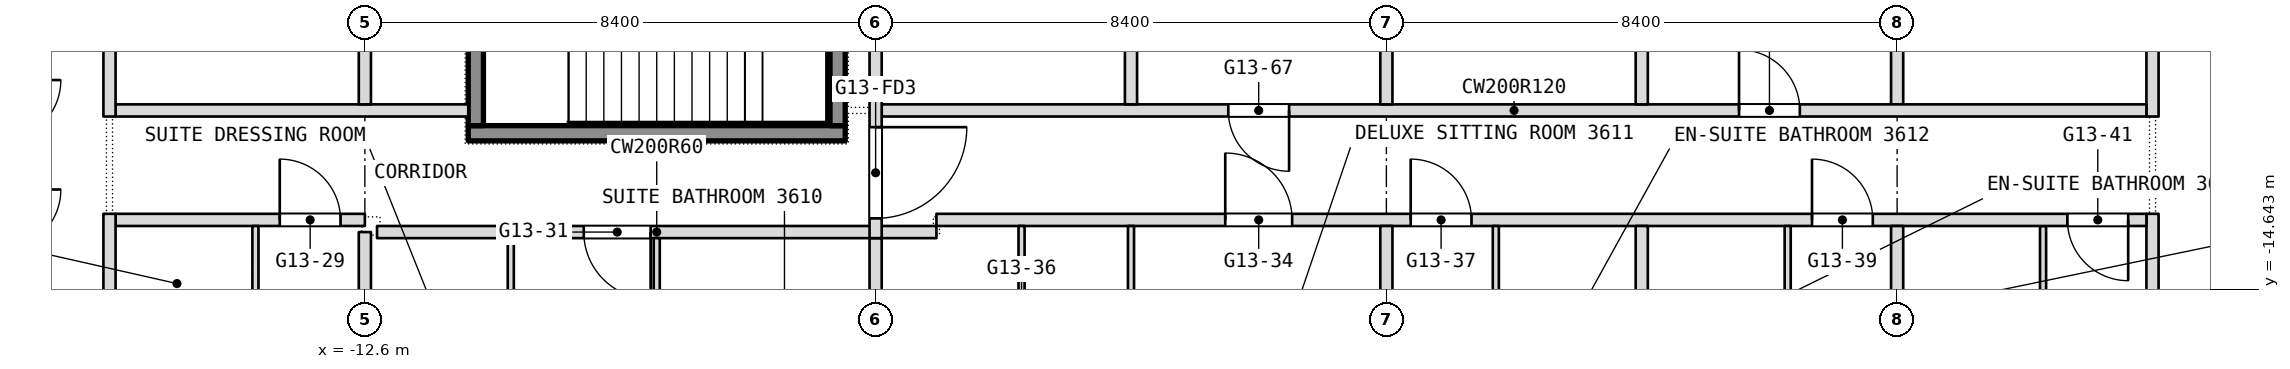
"""IFC4 building model, lengths in metres.
Left out: names, types, materials, properties, quantities, classifications, styles, units other than length and angle.
Written with IfcOpenShell. Run it as: python <this file> out.ifc"""

import sys

from ifc_helpers import new_model, si_unit, direction, frame, frame_2d, origin, place, context, subcontext, project, spatial, rectangle, extrude, element, fill, save


model = new_model("IFC4")
c1 = context("Model", 3, precision=1e-05, world=origin(), true_north=direction((0.0, 1.0)))
c2 = subcontext(c1, "Body", "Model", "MODEL_VIEW")
j1 = project(units=[si_unit("LENGTHUNIT", "METRE"), si_unit("PLANEANGLEUNIT", "RADIAN")], contexts=[c1])
p1 = place(None, origin())
s1 = spatial("IfcSite", under=j1, at=p1, CompositionType="ELEMENT")
p2 = place(p1, origin())
s2 = spatial("IfcBuilding", under=s1, at=p2, CompositionType="ELEMENT")
p3 = place(p2, frame((0.0, 0.0, 155.3)))
s3 = spatial("IfcBuildingStorey", under=s2, at=p3, CompositionType="ELEMENT", Elevation=155.3)
p4 = place(p3, frame((16.8, -22.186, 0.0), z_axis=(0.0, 0.0, 1.0), x_axis=(0.0, 1.0, 0.0)))
e1 = element("IfcWall", 1, at=p4, inside=s3, PredefinedType="PARTITIONING", context=c2, shape_type="SweptSolid", body=[
    extrude(rectangle(XDim=8.786, YDim=0.2, at=frame_2d((4.393, 0.0))), origin(), (0.0, 0.0, 1.0), 3.34),
])
p5 = place(p3, frame((16.8, -11.8, 0.0), z_axis=(0.0, 0.0, 1.0), x_axis=(0.0, 1.0, 0.0)))
e2 = element("IfcWall", 2, at=p5, inside=s3, PredefinedType="PARTITIONING", context=c2, shape_type="SweptSolid", body=[
    extrude(rectangle(XDim=9.9, YDim=0.2, at=frame_2d((4.95, 0.0))), origin(), (0.0, 0.0, 1.0), 3.34),
])
p6 = place(p3, frame((15.0, -16.85, 0.0), z_axis=(0.0, 0.0, 1.0), x_axis=(0.0, 1.0, 0.0)))
e3 = element("IfcWall", 3, at=p6, inside=s3, PredefinedType="PARTITIONING", context=c2, shape_type="SweptSolid", body=[
    extrude(rectangle(XDim=3.25, YDim=0.1, at=frame_2d((1.625, 0.0))), origin(), (0.0, 0.0, 1.0), 3.34),
])
p7 = place(p3, frame((-12.4, -13.7, 0.0), z_axis=(0.0, 0.0, 1.0), x_axis=(1.0, 0.0, 0.0)))
e4 = element("IfcWall", 4, at=p7, inside=s3, PredefinedType="PARTITIONING", context=c2, shape_type="SweptSolid", body=[
    extrude(rectangle(XDim=9.2, YDim=0.2, at=frame_2d((4.6, 0.0))), origin(), (0.0, 0.0, 1.0), 3.34),
])
p8 = place(p7, frame((3.4, 0.0, 0.0)))
e5 = element("IfcOpeningElement", 5, at=p8, cuts=e4, PredefinedType="OPENING", context=c2, shape_type="SweptSolid", body=[
    extrude(rectangle(XDim=1.1, YDim=2.1, at=frame_2d((0.55, 1.05))), frame((0.0, 0.1, 0.0), z_axis=(0.0, -1.0, 0.0), x_axis=(1.0, 0.0, 0.0)), (0.0, 0.0, 1.0), 0.2),
])
p9 = place(p3, frame((-16.7, -13.5, 0.0), z_axis=(0.0, 0.0, 1.0), x_axis=(1.0, 0.0, 0.0)))
e6 = element("IfcWall", 6, at=p9, inside=s3, PredefinedType="PARTITIONING", context=c2, shape_type="SweptSolid", body=[
    extrude(rectangle(XDim=4.1, YDim=0.2, at=frame_2d((2.05, 0.0))), origin(), (0.0, 0.0, 1.0), 3.34),
])
p10 = place(p9, frame((2.7, 0.0, 0.0)))
e7 = element("IfcOpeningElement", 7, at=p10, cuts=e6, PredefinedType="OPENING", context=c2, shape_type="SweptSolid", body=[
    extrude(rectangle(XDim=1.0, YDim=2.1, at=frame_2d((0.5, 1.05))), frame((0.0, 0.1, 0.0), z_axis=(0.0, -1.0, 0.0), x_axis=(1.0, 0.0, 0.0)), (0.0, 0.0, 1.0), 0.2),
])
p11 = place(p3, frame((-3.2, -13.5, 0.0), z_axis=(0.0, 0.0, 1.0), x_axis=(1.0, 0.0, 0.0)))
e8 = element("IfcWall", 8, at=p11, inside=s3, PredefinedType="PARTITIONING", context=c2, shape_type="SweptSolid", body=[
    extrude(rectangle(XDim=19.9, YDim=0.2, at=frame_2d((9.95, 0.0))), origin(), (0.0, 0.0, 1.0), 3.34),
])
p12 = place(p11, frame((4.75, 0.0, 0.0)))
e9 = element("IfcOpeningElement", 9, at=p12, cuts=e8, PredefinedType="OPENING", context=c2, shape_type="SweptSolid", body=[
    extrude(rectangle(XDim=1.1, YDim=2.1, at=frame_2d((0.55, 1.05))), frame((0.0, 0.1, 0.0), z_axis=(0.0, -1.0, 0.0), x_axis=(1.0, 0.0, 0.0)), (0.0, 0.0, 1.0), 0.2),
])
p13 = place(p11, frame((7.8, 0.0, 0.0)))
e10 = element("IfcOpeningElement", 10, at=p13, cuts=e8, PredefinedType="OPENING", context=c2, shape_type="SweptSolid", body=[
    extrude(rectangle(XDim=1.0, YDim=2.1, at=frame_2d((0.5, 1.05))), frame((0.0, 0.1, 0.0), z_axis=(0.0, -1.0, 0.0), x_axis=(1.0, 0.0, 0.0)), (0.0, 0.0, 1.0), 0.2),
])
p14 = place(p11, frame((14.4, 0.0, 0.0)))
e11 = element("IfcOpeningElement", 11, at=p14, cuts=e8, PredefinedType="OPENING", context=c2, shape_type="SweptSolid", body=[
    extrude(rectangle(XDim=1.0, YDim=2.1, at=frame_2d((0.5, 1.05))), frame((0.0, 0.1, 0.0), z_axis=(0.0, -1.0, 0.0), x_axis=(1.0, 0.0, 0.0)), (0.0, 0.0, 1.0), 0.2),
])
p15 = place(p11, frame((18.6, 0.0, 0.0)))
e12 = element("IfcOpeningElement", 12, at=p15, cuts=e8, PredefinedType="OPENING", context=c2, shape_type="SweptSolid", body=[
    extrude(rectangle(XDim=1.0, YDim=2.1, at=frame_2d((0.5, 1.05))), frame((0.0, 0.1, 0.0), z_axis=(0.0, -1.0, 0.0), x_axis=(1.0, 0.0, 0.0)), (0.0, 0.0, 1.0), 0.2),
])
p16 = place(p3, frame((12.6, -21.175, 0.0), z_axis=(0.0, 0.0, 1.0), x_axis=(0.0, 1.0, 0.0)))
e13 = element("IfcWall", 13, at=p16, inside=s3, PredefinedType="PARTITIONING", context=c2, shape_type="SweptSolid", body=[
    extrude(rectangle(XDim=7.575, YDim=0.2, at=frame_2d((3.788, 0.0))), origin(), (0.0, 0.0, 1.0), 3.34),
])
p17 = place(p3, frame((12.6, -11.6, 0.0), z_axis=(0.0, 0.0, 1.0), x_axis=(0.0, 1.0, 0.0)))
e14 = element("IfcWall", 14, at=p17, inside=s3, PredefinedType="PARTITIONING", context=c2, shape_type="SweptSolid", body=[
    extrude(rectangle(XDim=3.9, YDim=0.2, at=frame_2d((1.95, 0.0))), origin(), (0.0, 0.0, 1.0), 3.34),
])
p18 = place(p3, frame((-16.7, -11.7, 0.0), z_axis=(0.0, 0.0, 1.0), x_axis=(1.0, 0.0, 0.0)))
e15 = element("IfcWall", 15, at=p18, inside=s3, PredefinedType="PARTITIONING", context=c2, shape_type="SweptSolid", body=[
    extrude(rectangle(XDim=5.8, YDim=0.2, at=frame_2d((2.9, 0.0))), origin(), (0.0, 0.0, 1.0), 3.34),
])
p19 = place(p3, frame((-4.1, -11.7, 0.0), z_axis=(0.0, 0.0, 1.0), x_axis=(1.0, 0.0, 0.0)))
e16 = element("IfcWall", 16, at=p19, inside=s3, PredefinedType="PARTITIONING", context=c2, shape_type="SweptSolid", body=[
    extrude(rectangle(XDim=20.8, YDim=0.2, at=frame_2d((10.4, 0.0))), origin(), (0.0, 0.0, 1.0), 3.34),
])
p20 = place(p19, frame((14.1, 0.0, 0.0)))
e17 = element("IfcOpeningElement", 17, at=p20, cuts=e16, PredefinedType="OPENING", context=c2, shape_type="SweptSolid", body=[
    extrude(rectangle(XDim=1.0, YDim=2.1, at=frame_2d((0.5, 1.05))), frame((0.0, 0.1, 0.0), z_axis=(0.0, -1.0, 0.0), x_axis=(1.0, 0.0, 0.0)), (0.0, 0.0, 1.0), 0.2),
])
p21 = place(p19, frame((5.7, 0.0, 0.0)))
e18 = element("IfcOpeningElement", 18, at=p21, cuts=e16, PredefinedType="OPENING", context=c2, shape_type="SweptSolid", body=[
    extrude(rectangle(XDim=1.0, YDim=2.1, at=frame_2d((0.5, 1.05))), frame((0.0, 0.1, 0.0), z_axis=(0.0, -1.0, 0.0), x_axis=(1.0, 0.0, 0.0)), (0.0, 0.0, 1.0), 0.2),
])
p22 = place(p3, frame((10.8, -17.65, 0.0), z_axis=(0.0, 0.0, 1.0), x_axis=(0.0, 1.0, 0.0)))
e19 = element("IfcWall", 19, at=p22, inside=s3, PredefinedType="PARTITIONING", context=c2, shape_type="SweptSolid", body=[
    extrude(rectangle(XDim=4.05, YDim=0.1, at=frame_2d((2.025, 0.0))), origin(), (0.0, 0.0, 1.0), 3.34),
])
p23 = place(p3, frame((8.4, -23.3, 0.0), z_axis=(0.0, 0.0, 1.0), x_axis=(0.0, 1.0, 0.0)))
e20 = element("IfcWall", 20, at=p23, inside=s3, PredefinedType="PARTITIONING", context=c2, shape_type="SweptSolid", body=[
    extrude(rectangle(XDim=9.7, YDim=0.2, at=frame_2d((4.85, 0.0))), origin(), (0.0, 0.0, 1.0), 3.34),
])
p24 = place(p3, frame((8.4, -11.6, 0.0), z_axis=(0.0, 0.0, 1.0), x_axis=(0.0, 1.0, 0.0)))
e21 = element("IfcWall", 21, at=p24, inside=s3, PredefinedType="PARTITIONING", context=c2, shape_type="SweptSolid", body=[
    extrude(rectangle(XDim=3.8, YDim=0.2, at=frame_2d((1.9, 0.0))), origin(), (0.0, 0.0, 1.0), 3.34),
])
p25 = place(p3, frame((6.0, -17.75, 0.0), z_axis=(0.0, 0.0, 1.0), x_axis=(0.0, 1.0, 0.0)))
e22 = element("IfcWall", 22, at=p25, inside=s3, PredefinedType="PARTITIONING", context=c2, shape_type="SweptSolid", body=[
    extrude(rectangle(XDim=4.15, YDim=0.1, at=frame_2d((2.075, 0.0))), origin(), (0.0, 0.0, 1.0), 3.34),
])
p26 = place(p3, frame((4.2, -23.3, 0.0), z_axis=(0.0, 0.0, 1.0), x_axis=(0.0, 1.0, 0.0)))
e23 = element("IfcWall", 23, at=p26, inside=s3, PredefinedType="PARTITIONING", context=c2, shape_type="SweptSolid", body=[
    extrude(rectangle(XDim=9.7, YDim=0.2, at=frame_2d((4.85, 0.0))), origin(), (0.0, 0.0, 1.0), 3.34),
])
p27 = place(p3, frame((4.2, -11.6, 0.0), z_axis=(0.0, 0.0, 1.0), x_axis=(0.0, 1.0, 0.0)))
e24 = element("IfcWall", 24, at=p27, inside=s3, PredefinedType="PARTITIONING", context=c2, shape_type="SweptSolid", body=[
    extrude(rectangle(XDim=9.7, YDim=0.2, at=frame_2d((4.85, 0.0))), origin(), (0.0, 0.0, 1.0), 3.34),
])
p28 = place(p3, frame((0.0, -23.3, 0.0), z_axis=(0.0, 0.0, 1.0), x_axis=(0.0, 1.0, 0.0)))
e25 = element("IfcWall", 25, at=p28, inside=s3, PredefinedType="PARTITIONING", context=c2, shape_type="SweptSolid", body=[
    extrude(rectangle(XDim=9.7, YDim=0.1, at=frame_2d((4.85, 0.0))), origin(), (0.0, 0.0, 1.0), 3.34),
])
p29 = place(p28, frame((3.65, 0.0, 0.0)))
e26 = element("IfcOpeningElement", 26, at=p29, cuts=e25, PredefinedType="OPENING", context=c2, shape_type="SweptSolid", body=[
    extrude(rectangle(XDim=0.9, YDim=2.1, at=frame_2d((0.45, 1.05))), frame((0.0, 0.05, 0.0), z_axis=(0.0, -1.0, 0.0), x_axis=(1.0, 0.0, 0.0)), (0.0, 0.0, 1.0), 0.1),
])
p30 = place(p3, frame((0.0, -11.6, 0.0), z_axis=(0.0, 0.0, 1.0), x_axis=(0.0, 1.0, 0.0)))
e27 = element("IfcWall", 27, at=p30, inside=s3, PredefinedType="PARTITIONING", context=c2, shape_type="SweptSolid", body=[
    extrude(rectangle(XDim=9.7, YDim=0.2, at=frame_2d((4.85, 0.0))), origin(), (0.0, 0.0, 1.0), 3.34),
])
p31 = place(p3, frame((-1.8, -17.05, 0.0), z_axis=(0.0, 0.0, 1.0), x_axis=(0.0, 1.0, 0.0)))
e28 = element("IfcWall", 28, at=p31, inside=s3, PredefinedType="PARTITIONING", context=c2, shape_type="SweptSolid", body=[
    extrude(rectangle(XDim=3.45, YDim=0.1, at=frame_2d((1.725, 0.0))), origin(), (0.0, 0.0, 1.0), 3.34),
])
p32 = place(p31, frame((1.3, 0.0, 0.0)))
e29 = element("IfcOpeningElement", 29, at=p32, cuts=e28, PredefinedType="OPENING", context=c2, shape_type="SweptSolid", body=[
    extrude(rectangle(XDim=0.9, YDim=2.1, at=frame_2d((0.45, 1.05))), frame((0.0, 0.05, 0.0), z_axis=(0.0, -1.0, 0.0), x_axis=(1.0, 0.0, 0.0)), (0.0, 0.0, 1.0), 0.1),
])
p33 = place(p3, frame((-4.2, -23.3, 0.0), z_axis=(0.0, 0.0, 1.0), x_axis=(0.0, 1.0, 0.0)))
e30 = element("IfcWall", 30, at=p33, inside=s3, PredefinedType="PARTITIONING", context=c2, shape_type="SweptSolid", body=[
    extrude(rectangle(XDim=9.5, YDim=0.2, at=frame_2d((4.75, 0.0))), origin(), (0.0, 0.0, 1.0), 3.34),
])
p34 = place(p3, frame((-4.2, -13.8, 0.0), z_axis=(0.0, 0.0, 1.0), x_axis=(0.0, 1.0, 0.0)))
e31 = element("IfcWall", 31, at=p34, inside=s3, PredefinedType="PARTITIONING", context=c2, shape_type="SweptSolid", body=[
    extrude(rectangle(XDim=13.8, YDim=0.2, at=frame_2d((6.9, 0.0))), origin(), (0.0, 0.0, 1.0), 3.34),
])
p35 = place(p34, frame((12.15, 0.0, 0.0)))
e32 = element("IfcOpeningElement", 32, at=p35, cuts=e31, PredefinedType="OPENING", context=c2, shape_type="SweptSolid", body=[
    extrude(rectangle(XDim=1.5, YDim=2.1, at=frame_2d((0.75, 1.05))), frame((0.0, 0.1, 0.0), z_axis=(0.0, -1.0, 0.0), x_axis=(1.0, 0.0, 0.0)), (0.0, 0.0, 1.0), 0.2),
])
p36 = place(p34, frame((0.325, 0.0, 0.0)))
e33 = element("IfcOpeningElement", 33, at=p36, cuts=e31, PredefinedType="OPENING", context=c2, shape_type="SweptSolid", body=[
    extrude(rectangle(XDim=1.5, YDim=2.1, at=frame_2d((0.75, 1.05))), frame((0.0, 0.1, 0.0), z_axis=(0.0, -1.0, 0.0), x_axis=(1.0, 0.0, 0.0)), (0.0, 0.0, 1.0), 0.2),
])
p37 = place(p3, frame((-7.8, -17.35, 0.0), z_axis=(0.0, 0.0, 1.0), x_axis=(0.0, 1.0, 0.0)))
e34 = element("IfcWall", 34, at=p37, inside=s3, PredefinedType="PARTITIONING", context=c2, shape_type="SweptSolid", body=[
    extrude(rectangle(XDim=3.55, YDim=0.1, at=frame_2d((1.775, 0.0))), origin(), (0.0, 0.0, 1.0), 3.34),
])
p38 = place(p3, frame((-10.2, -17.25, 0.0), z_axis=(0.0, 0.0, 1.0), x_axis=(0.0, 1.0, 0.0)))
e35 = element("IfcWall", 35, at=p38, inside=s3, PredefinedType="PARTITIONING", context=c2, shape_type="SweptSolid", body=[
    extrude(rectangle(XDim=3.45, YDim=0.1, at=frame_2d((1.725, 0.0))), origin(), (0.0, 0.0, 1.0), 3.34),
])
p39 = place(p3, frame((-12.6, -21.175, 0.0), z_axis=(0.0, 0.0, 1.0), x_axis=(0.0, 1.0, 0.0)))
e36 = element("IfcWall", 36, at=p39, inside=s3, PredefinedType="PARTITIONING", context=c2, shape_type="SweptSolid", body=[
    extrude(rectangle(XDim=7.475, YDim=0.2, at=frame_2d((3.738, 0.0))), origin(), (0.0, 0.0, 1.0), 3.34),
])
p40 = place(p3, frame((-12.6, -11.6, 0.0), z_axis=(0.0, 0.0, 1.0), x_axis=(0.0, 1.0, 0.0)))
e37 = element("IfcWall", 37, at=p40, inside=s3, PredefinedType="PARTITIONING", context=c2, shape_type="SweptSolid", body=[
    extrude(rectangle(XDim=9.7, YDim=0.2, at=frame_2d((4.85, 0.0))), origin(), (0.0, 0.0, 1.0), 3.34),
])
p41 = place(p3, frame((-14.4, -16.45, 0.0), z_axis=(0.0, 0.0, 1.0), x_axis=(0.0, 1.0, 0.0)))
e38 = element("IfcWall", 38, at=p41, inside=s3, PredefinedType="PARTITIONING", context=c2, shape_type="SweptSolid", body=[
    extrude(rectangle(XDim=2.85, YDim=0.1, at=frame_2d((1.425, 0.0))), origin(), (0.0, 0.0, 1.0), 3.34),
])
p42 = place(p3, frame((-16.8, -22.186, 0.0), z_axis=(0.0, 0.0, 1.0), x_axis=(0.0, 1.0, 0.0)))
e39 = element("IfcWall", 39, at=p42, inside=s3, PredefinedType="PARTITIONING", context=c2, shape_type="SweptSolid", body=[
    extrude(rectangle(XDim=8.786, YDim=0.2, at=frame_2d((4.393, 0.0))), origin(), (0.0, 0.0, 1.0), 3.34),
])
p43 = place(p3, frame((-16.8, -11.8, 0.0), z_axis=(0.0, 0.0, 1.0), x_axis=(0.0, 1.0, 0.0)))
e40 = element("IfcWall", 40, at=p43, inside=s3, PredefinedType="PARTITIONING", context=c2, shape_type="SweptSolid", body=[
    extrude(rectangle(XDim=9.9, YDim=0.2, at=frame_2d((4.95, 0.0))), origin(), (0.0, 0.0, 1.0), 3.34),
])
p44 = place(p3, frame((-10.9, -12.075, 0.1), z_axis=(0.0, 0.0, 1.0), x_axis=(1.0, 0.0, 0.0)))
e41 = element("IfcWall", 41, at=p44, inside=s3, PredefinedType="SHEAR", context=c2, shape_type="SweptSolid", body=[
    extrude(rectangle(XDim=6.2, YDim=0.25, at=frame_2d((3.1, 0.0))), origin(), (0.0, 0.0, 1.0), 3.6),
])
for number, where, z_axis, x_axis in (
    (42, (-10.775, -11.95, 0.1), (0.0, 0.0, 1.0), (0.0, 1.0, 0.0)),
    (43, (-4.825, -11.95, 0.1), (0.0, 0.0, 1.0), (0.0, 1.0, 0.0)),
):
    element("IfcWall", number, at=place(p3, frame(where, z_axis=z_axis, x_axis=x_axis)), inside=s3, PredefinedType="SHEAR", context=c2, shape_type="SweptSolid", body=[
        extrude(rectangle(XDim=2.9, YDim=0.25, at=frame_2d((1.45, 0.0))), origin(), (0.0, 0.0, 1.0), 3.6),
    ])
p45 = place(p8, origin())
e44 = element("IfcDoor", 44, at=p45, inside=s3, OperationType="SINGLE_SWING_LEFT", PredefinedType="DOOR", context=c2, shape_type="SweptSolid", body=[
    extrude(rectangle(XDim=1.1, YDim=2.1, at=frame_2d((0.55, 1.05))), frame((0.0, 0.025, 0.0), z_axis=(0.0, -1.0, 0.0), x_axis=(1.0, 0.0, 0.0)), (0.0, 0.0, 1.0), 0.05),
])
fill(e5, e44)
p46 = place(p10, origin())
e45 = element("IfcDoor", 45, at=p46, inside=s3, OperationType="SINGLE_SWING_LEFT", PredefinedType="DOOR", context=c2, shape_type="SweptSolid", body=[
    extrude(rectangle(XDim=1.0, YDim=2.1, at=frame_2d((0.5, 1.05))), frame((0.0, 0.025, 0.0), z_axis=(0.0, -1.0, 0.0), x_axis=(1.0, 0.0, 0.0)), (0.0, 0.0, 1.0), 0.05),
])
fill(e7, e45)
p47 = place(p12, origin())
e46 = element("IfcDoor", 46, at=p47, inside=s3, OperationType="SINGLE_SWING_RIGHT", PredefinedType="DOOR", context=c2, shape_type="SweptSolid", body=[
    extrude(rectangle(XDim=1.1, YDim=2.1, at=frame_2d((0.55, 1.05))), frame((0.0, 0.025, 0.0), z_axis=(0.0, -1.0, 0.0), x_axis=(1.0, 0.0, 0.0)), (0.0, 0.0, 1.0), 0.05),
])
fill(e9, e46)
p48 = place(p13, origin())
e47 = element("IfcDoor", 47, at=p48, inside=s3, OperationType="SINGLE_SWING_LEFT", PredefinedType="DOOR", context=c2, shape_type="SweptSolid", body=[
    extrude(rectangle(XDim=1.0, YDim=2.1, at=frame_2d((0.5, 1.05))), frame((0.0, 0.025, 0.0), z_axis=(0.0, -1.0, 0.0), x_axis=(1.0, 0.0, 0.0)), (0.0, 0.0, 1.0), 0.05),
])
fill(e10, e47)
p49 = place(p14, origin())
e48 = element("IfcDoor", 48, at=p49, inside=s3, OperationType="SINGLE_SWING_LEFT", PredefinedType="DOOR", context=c2, shape_type="SweptSolid", body=[
    extrude(rectangle(XDim=1.0, YDim=2.1, at=frame_2d((0.5, 1.05))), frame((0.0, 0.025, 0.0), z_axis=(0.0, -1.0, 0.0), x_axis=(1.0, 0.0, 0.0)), (0.0, 0.0, 1.0), 0.05),
])
fill(e11, e48)
p50 = place(p15, origin())
e49 = element("IfcDoor", 49, at=p50, inside=s3, OperationType="SINGLE_SWING_LEFT", PredefinedType="DOOR", context=c2, shape_type="SweptSolid", body=[
    extrude(rectangle(XDim=1.0, YDim=2.1, at=frame_2d((0.5, 1.05))), frame((0.0, 0.025, 0.0), z_axis=(0.0, -1.0, 0.0), x_axis=(1.0, 0.0, 0.0)), (0.0, 0.0, 1.0), 0.05),
])
fill(e12, e49)
p51 = place(p20, origin())
e50 = element("IfcDoor", 50, at=p51, inside=s3, OperationType="SINGLE_SWING_LEFT", PredefinedType="DOOR", context=c2, shape_type="SweptSolid", body=[
    extrude(rectangle(XDim=1.0, YDim=2.1, at=frame_2d((0.5, 1.05))), frame((0.0, 0.025, 0.0), z_axis=(0.0, -1.0, 0.0), x_axis=(1.0, 0.0, 0.0)), (0.0, 0.0, 1.0), 0.05),
])
fill(e17, e50)
p52 = place(p21, origin())
e51 = element("IfcDoor", 51, at=p52, inside=s3, OperationType="SINGLE_SWING_LEFT", PredefinedType="DOOR", context=c2, shape_type="SweptSolid", body=[
    extrude(rectangle(XDim=1.0, YDim=2.1, at=frame_2d((0.5, 1.05))), frame((0.0, 0.025, 0.0), z_axis=(0.0, -1.0, 0.0), x_axis=(1.0, 0.0, 0.0)), (0.0, 0.0, 1.0), 0.05),
])
fill(e18, e51)
p53 = place(p36, origin())
e52 = element("IfcDoor", 52, at=p53, inside=s3, OperationType="DOUBLE_DOOR_DOUBLE_SWING", PredefinedType="DOOR", context=c2, shape_type="SweptSolid", body=[
    extrude(rectangle(XDim=1.5, YDim=2.1, at=frame_2d((0.75, 1.05))), frame((0.0, 0.025, 0.0), z_axis=(0.0, -1.0, 0.0), x_axis=(1.0, 0.0, 0.0)), (0.0, 0.0, 1.0), 0.05),
])
fill(e33, e52)
save(model, sys.argv[1])
